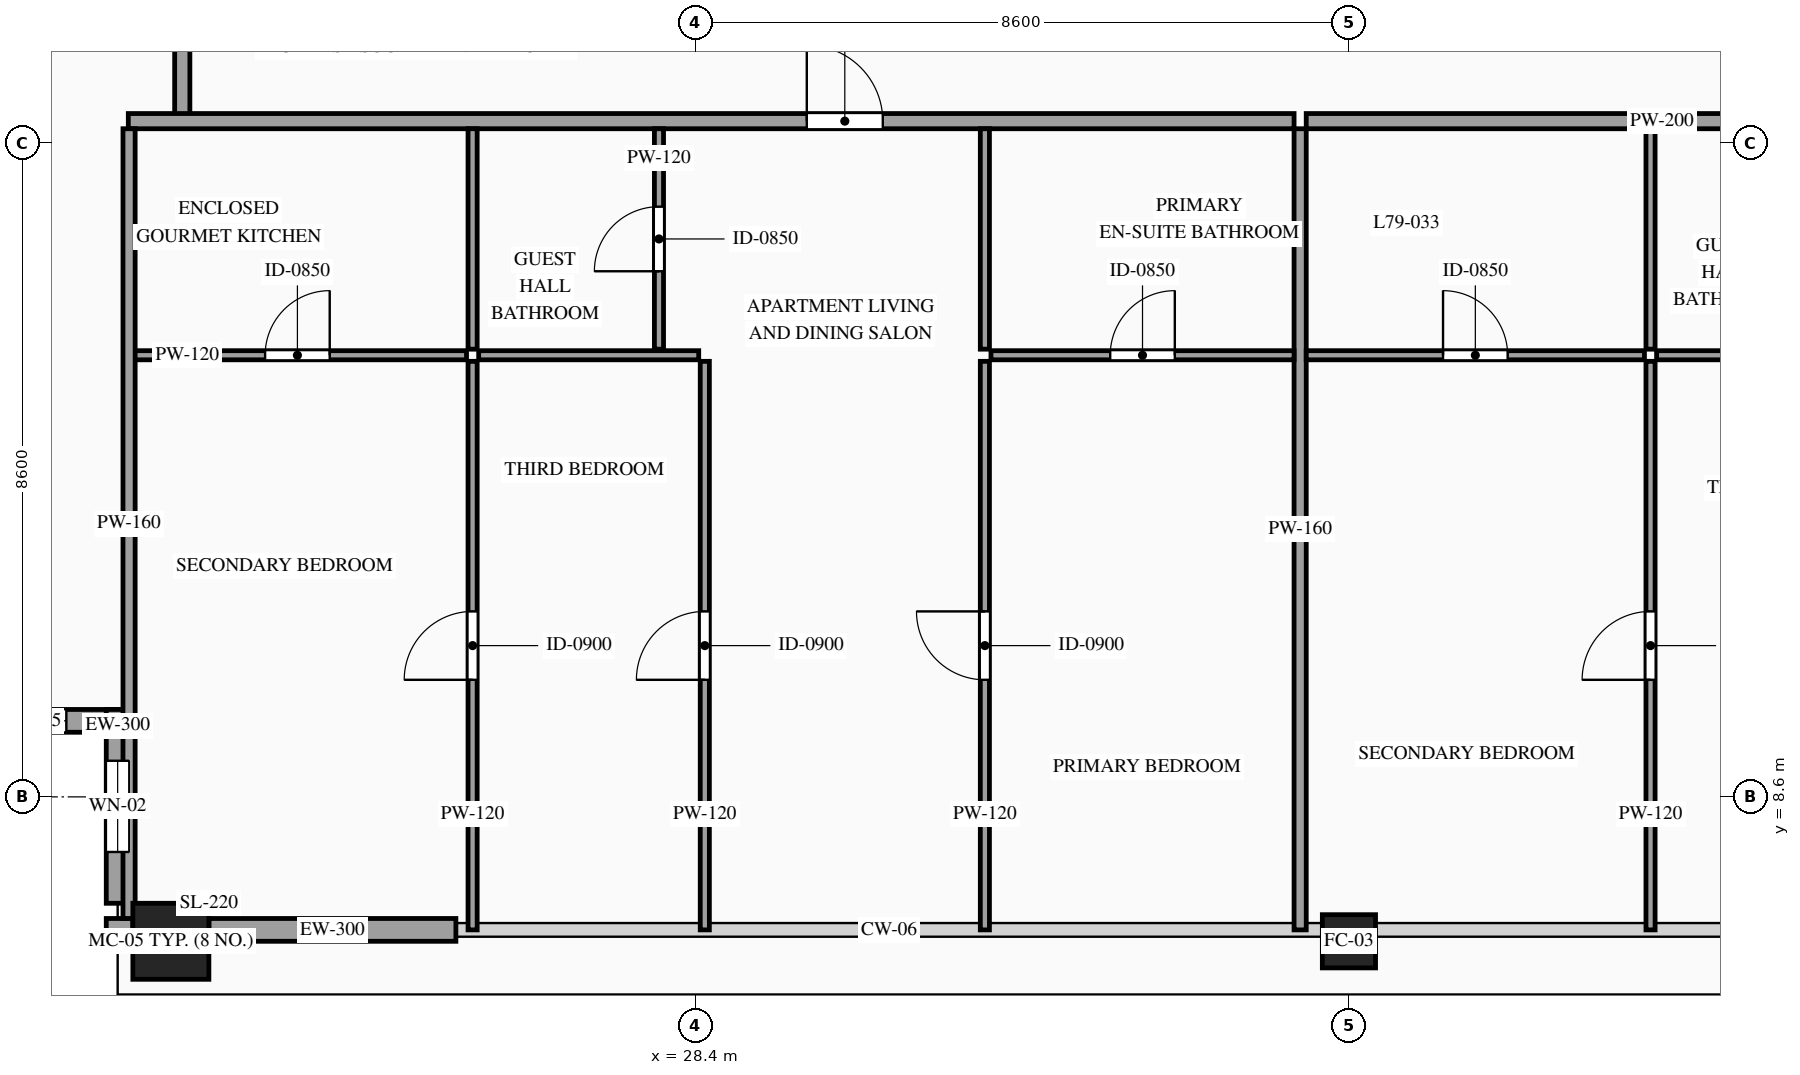
"""IFC4 building model, lengths in metres.
Left out: names, types, materials, properties, quantities, classifications, styles, units other than length and angle.
Written with IfcOpenShell. Run it as: python <this file> out.ifc"""

import sys

from ifc_helpers import new_model, si_unit, direction, frame, frame_2d, origin, origin_2d, place, context, subcontext, project, spatial, rectangle, hollow_rectangle, extrude, source, transform, mapped, element, fill, save


model = new_model("IFC4")
c1 = context("Model", 3, precision=1e-05, world=origin(), true_north=direction((0.0, 1.0)))
c2 = subcontext(c1, "Body", "Model", "MODEL_VIEW")
j1 = project(units=[si_unit("LENGTHUNIT", "METRE"), si_unit("PLANEANGLEUNIT", "RADIAN")], contexts=[c1])
p1 = place(None, origin())
s1 = spatial("IfcSite", under=j1, at=p1, CompositionType="ELEMENT")
p2 = place(p1, origin())
s2 = spatial("IfcBuilding", under=s1, at=p2, CompositionType="ELEMENT")
p3 = place(p2, frame((0.0, 0.0, 296.1)))
s3 = spatial("IfcBuildingStorey", under=s2, at=p3, CompositionType="ELEMENT", Elevation=296.1)
m1 = source(origin(), c2, "Body", "SweptSolid", [
    extrude(hollow_rectangle(XDim=1.0, YDim=1.0, WallThickness=0.048, at=origin_2d()), origin(), (0.0, 0.0, 1.0), 3.5),
])
p4 = place(p3, frame((21.5, 6.7, 0.0), z_axis=(0.0, 0.0, 1.0), x_axis=(1.0, 0.0, 0.0)))
e1 = element("IfcColumn", 1, at=p4, inside=s3, PredefinedType="COLUMN", context=c2, shape_type="MappedRepresentation", body=[
    mapped(m1, transform((0.0, 0.0, 0.0), scale=1.0)),
])
m2 = source(origin(), c2, "Body", "SweptSolid", [
    extrude(hollow_rectangle(XDim=0.7, YDim=0.7, WallThickness=0.032, at=origin_2d()), origin(), (0.0, 0.0, 1.0), 3.5),
])
p5 = place(p3, frame((37.0, 6.7, 0.0), z_axis=(0.0, 0.0, 1.0), x_axis=(1.0, 0.0, 0.0)))
e2 = element("IfcColumn", 2, at=p5, inside=s3, PredefinedType="COLUMN", context=c2, shape_type="MappedRepresentation", body=[
    mapped(m2, transform((0.0, 0.0, 0.0), scale=1.0)),
])
p6 = place(p3, frame((18.4, 9.6, 0.0), z_axis=(0.0, 0.0, 1.0), x_axis=(1.0, 0.0, 0.0)))
e3 = element("IfcWall", 3, at=p6, inside=s3, PredefinedType="SOLIDWALL", context=c2, shape_type="SweptSolid", body=[
    extrude(rectangle(XDim=2.55, YDim=0.3, at=frame_2d((1.275, 0.0))), origin(), (0.0, 0.0, 1.0), 3.28),
])
p7 = place(p6, frame((0.825, 0.0, 0.85)))
e4 = element("IfcOpeningElement", 4, at=p7, cuts=e3, PredefinedType="OPENING", context=c2, shape_type="SweptSolid", body=[
    extrude(rectangle(XDim=0.9, YDim=1.5, at=frame_2d((0.45, 0.75))), frame((0.0, 0.165, 0.0), z_axis=(0.0, -1.0, 0.0), x_axis=(1.0, 0.0, 0.0)), (0.0, 0.0, 1.0), 0.33),
])
p8 = place(p3, frame((20.8, 9.75, 0.0), z_axis=(0.0, 0.0, 1.0), x_axis=(0.0, -1.0, 0.0)))
e5 = element("IfcWall", 5, at=p8, inside=s3, PredefinedType="SOLIDWALL", context=c2, shape_type="SweptSolid", body=[
    extrude(rectangle(XDim=2.55, YDim=0.3, at=frame_2d((1.275, 0.0))), origin(), (0.0, 0.0, 1.0), 3.28),
])
p9 = place(p8, frame((0.675, 0.0, 0.85)))
e6 = element("IfcOpeningElement", 6, at=p9, cuts=e5, PredefinedType="OPENING", context=c2, shape_type="SweptSolid", body=[
    extrude(rectangle(XDim=1.2, YDim=2.1, at=frame_2d((0.6, 1.05))), frame((0.0, 0.165, 0.0), z_axis=(0.0, -1.0, 0.0), x_axis=(1.0, 0.0, 0.0)), (0.0, 0.0, 1.0), 0.33),
])
m3 = source(origin(), c2, "Body", "SweptSolid", [
    extrude(rectangle(XDim=0.35, YDim=0.3, at=frame_2d((0.175, 0.0))), origin(), (0.0, 0.0, 1.0), 3.28),
])
p10 = place(p3, frame((20.65, 6.85, 0.0), z_axis=(0.0, 0.0, 1.0), x_axis=(1.0, 0.0, 0.0)))
e7 = element("IfcWall", 7, at=p10, inside=s3, PredefinedType="SOLIDWALL", context=c2, shape_type="MappedRepresentation", body=[
    mapped(m3, transform((0.0, 0.0, 0.0), scale=1.0)),
])
m4 = source(origin(), c2, "Body", "SweptSolid", [
    extrude(rectangle(XDim=3.25, YDim=0.3, at=frame_2d((1.625, 0.0))), origin(), (0.0, 0.0, 1.0), 2.885),
])
p11 = place(p3, frame((22.0, 6.85, 0.0), z_axis=(0.0, 0.0, 1.0), x_axis=(1.0, 0.0, 0.0)))
e8 = element("IfcWall", 8, at=p11, inside=s3, PredefinedType="SOLIDWALL", context=c2, shape_type="MappedRepresentation", body=[
    mapped(m4, transform((0.0, 0.0, 0.0), scale=1.0)),
])
m5 = source(origin(), c2, "Body", "SweptSolid", [
    extrude(rectangle(XDim=1.7, YDim=0.2, at=frame_2d((0.85, 0.0))), origin(), (0.0, 0.0, 1.0), 3.28),
])
p12 = place(p3, frame((21.65, 17.55, 0.0), z_axis=(0.0, 0.0, 1.0), x_axis=(0.0, 1.0, 0.0)))
e9 = element("IfcWall", 9, at=p12, inside=s3, PredefinedType="PARTITIONING", context=c2, shape_type="MappedRepresentation", body=[
    mapped(m5, transform((0.0, 0.0, 0.0), scale=1.0)),
])
p13 = place(p3, frame((20.94, 17.49, 0.0), z_axis=(0.0, 0.0, 1.0), x_axis=(1.0, 0.0, 0.0)))
e10 = element("IfcWall", 10, at=p13, inside=s3, PredefinedType="PARTITIONING", context=c2, shape_type="SweptSolid", body=[
    extrude(rectangle(XDim=15.338, YDim=0.2, at=frame_2d((7.669, 0.0))), origin(), (0.0, 0.0, 1.0), 3.28),
])
p14 = place(p13, frame((8.927, 0.0, 0.0)))
e11 = element("IfcOpeningElement", 11, at=p14, cuts=e10, PredefinedType="OPENING", context=c2, shape_type="SweptSolid", body=[
    extrude(rectangle(XDim=1.0, YDim=2.2, at=frame_2d((0.5, 1.1))), frame((0.0, 0.115, 0.0), z_axis=(0.0, -1.0, 0.0), x_axis=(1.0, 0.0, 0.0)), (0.0, 0.0, 1.0), 0.23),
])
m6 = source(origin(), c2, "Body", "SweptSolid", [
    extrude(rectangle(XDim=10.54, YDim=0.16, at=frame_2d((5.27, 0.0))), origin(), (0.0, 0.0, 1.0), 3.28),
])
p15 = place(p3, frame((36.358, 6.85, 0.0), z_axis=(0.0, 0.0, 1.0), x_axis=(0.0, 1.0, 0.0)))
e12 = element("IfcWall", 12, at=p15, inside=s3, PredefinedType="PARTITIONING", context=c2, shape_type="MappedRepresentation", body=[
    mapped(m6, transform((0.0, 0.0, 0.0), scale=1.0)),
])
p16 = place(p3, frame((20.94, 14.41, 0.0), z_axis=(0.0, 0.0, 1.0), x_axis=(1.0, 0.0, 0.0)))
e13 = element("IfcWall", 13, at=p16, inside=s3, PredefinedType="PARTITIONING", context=c2, shape_type="SweptSolid", body=[
    extrude(rectangle(XDim=4.45, YDim=0.12, at=frame_2d((2.225, 0.0))), origin(), (0.0, 0.0, 1.0), 3.28),
])
p17 = place(p16, frame((1.8, 0.0, 0.0)))
e14 = element("IfcOpeningElement", 14, at=p17, cuts=e13, PredefinedType="OPENING", context=c2, shape_type="SweptSolid", body=[
    extrude(rectangle(XDim=0.85, YDim=2.1, at=frame_2d((0.425, 1.05))), frame((0.0, 0.075, 0.0), z_axis=(0.0, -1.0, 0.0), x_axis=(1.0, 0.0, 0.0)), (0.0, 0.0, 1.0), 0.15),
])
m7 = source(origin(), c2, "Body", "SweptSolid", [
    extrude(rectangle(XDim=2.9, YDim=0.12, at=frame_2d((1.45, 0.0))), origin(), (0.0, 0.0, 1.0), 3.28),
])
p18 = place(p3, frame((25.47, 14.49, 0.0), z_axis=(0.0, 0.0, 1.0), x_axis=(0.0, 1.0, 0.0)))
e15 = element("IfcWall", 15, at=p18, inside=s3, PredefinedType="PARTITIONING", context=c2, shape_type="MappedRepresentation", body=[
    mapped(m7, transform((0.0, 0.0, 0.0), scale=1.0)),
])
p19 = place(p3, frame((27.922, 14.49, 0.0), z_axis=(0.0, 0.0, 1.0), x_axis=(0.0, 1.0, 0.0)))
e16 = element("IfcWall", 16, at=p19, inside=s3, PredefinedType="PARTITIONING", context=c2, shape_type="SweptSolid", body=[
    extrude(rectangle(XDim=2.9, YDim=0.12, at=frame_2d((1.45, 0.0))), origin(), (0.0, 0.0, 1.0), 3.28),
])
p20 = place(p19, frame((1.025, 0.0, 0.0)))
e17 = element("IfcOpeningElement", 17, at=p20, cuts=e16, PredefinedType="OPENING", context=c2, shape_type="SweptSolid", body=[
    extrude(rectangle(XDim=0.85, YDim=2.1, at=frame_2d((0.425, 1.05))), frame((0.0, 0.075, 0.0), z_axis=(0.0, -1.0, 0.0), x_axis=(1.0, 0.0, 0.0)), (0.0, 0.0, 1.0), 0.15),
])
p21 = place(p3, frame((32.29, 14.41, 0.0), z_axis=(0.0, 0.0, 1.0), x_axis=(1.0, 0.0, 0.0)))
e18 = element("IfcWall", 18, at=p21, inside=s3, PredefinedType="PARTITIONING", context=c2, shape_type="SweptSolid", body=[
    extrude(rectangle(XDim=3.988, YDim=0.12, at=frame_2d((1.994, 0.0))), origin(), (0.0, 0.0, 1.0), 3.28),
])
p22 = place(p21, frame((1.569, 0.0, 0.0)))
e19 = element("IfcOpeningElement", 19, at=p22, cuts=e18, PredefinedType="OPENING", context=c2, shape_type="SweptSolid", body=[
    extrude(rectangle(XDim=0.85, YDim=2.1, at=frame_2d((0.425, 1.05))), frame((0.0, 0.075, 0.0), z_axis=(0.0, -1.0, 0.0), x_axis=(1.0, 0.0, 0.0)), (0.0, 0.0, 1.0), 0.15),
])
p23 = place(p3, frame((32.21, 14.49, 0.0), z_axis=(0.0, 0.0, 1.0), x_axis=(0.0, 1.0, 0.0)))
e20 = element("IfcWall", 20, at=p23, inside=s3, PredefinedType="PARTITIONING", context=c2, shape_type="MappedRepresentation", body=[
    mapped(m7, transform((0.0, 0.0, 0.0), scale=1.0)),
])
p24 = place(p3, frame((25.47, 6.85, 0.0), z_axis=(0.0, 0.0, 1.0), x_axis=(0.0, 1.0, 0.0)))
e21 = element("IfcWall", 21, at=p24, inside=s3, PredefinedType="PARTITIONING", context=c2, shape_type="SweptSolid", body=[
    extrude(rectangle(XDim=7.48, YDim=0.12, at=frame_2d((3.74, 0.0))), origin(), (0.0, 0.0, 1.0), 3.28),
])
p25 = place(p24, frame((3.29, 0.0, 0.0)))
e22 = element("IfcOpeningElement", 22, at=p25, cuts=e21, PredefinedType="OPENING", context=c2, shape_type="SweptSolid", body=[
    extrude(rectangle(XDim=0.9, YDim=2.15, at=frame_2d((0.45, 1.075))), frame((0.0, 0.075, 0.0), z_axis=(0.0, -1.0, 0.0), x_axis=(1.0, 0.0, 0.0)), (0.0, 0.0, 1.0), 0.15),
])
p26 = place(p3, frame((32.21, 6.85, 0.0), z_axis=(0.0, 0.0, 1.0), x_axis=(0.0, 1.0, 0.0)))
e23 = element("IfcWall", 23, at=p26, inside=s3, PredefinedType="PARTITIONING", context=c2, shape_type="SweptSolid", body=[
    extrude(rectangle(XDim=7.48, YDim=0.12, at=frame_2d((3.74, 0.0))), origin(), (0.0, 0.0, 1.0), 3.28),
])
p27 = place(p26, frame((3.29, 0.0, 0.0)))
e24 = element("IfcOpeningElement", 24, at=p27, cuts=e23, PredefinedType="OPENING", context=c2, shape_type="SweptSolid", body=[
    extrude(rectangle(XDim=0.9, YDim=2.15, at=frame_2d((0.45, 1.075))), frame((0.0, 0.075, 0.0), z_axis=(0.0, -1.0, 0.0), x_axis=(1.0, 0.0, 0.0)), (0.0, 0.0, 1.0), 0.15),
])
m8 = source(origin(), c2, "Body", "SweptSolid", [
    extrude(rectangle(XDim=2.895, YDim=0.12, at=frame_2d((1.448, 0.0))), origin(), (0.0, 0.0, 1.0), 3.28),
])
p28 = place(p3, frame((25.55, 14.41, 0.0), z_axis=(0.0, 0.0, 1.0), x_axis=(1.0, 0.0, 0.0)))
e25 = element("IfcWall", 25, at=p28, inside=s3, PredefinedType="PARTITIONING", context=c2, shape_type="MappedRepresentation", body=[
    mapped(m8, transform((0.0, 0.0, 0.0), scale=1.0)),
])
p29 = place(p3, frame((28.525, 6.85, 0.0), z_axis=(0.0, 0.0, 1.0), x_axis=(0.0, 1.0, 0.0)))
e26 = element("IfcWall", 26, at=p29, inside=s3, PredefinedType="PARTITIONING", context=c2, shape_type="SweptSolid", body=[
    extrude(rectangle(XDim=7.48, YDim=0.12, at=frame_2d((3.74, 0.0))), origin(), (0.0, 0.0, 1.0), 3.28),
])
p30 = place(p29, frame((3.29, 0.0, 0.0)))
e27 = element("IfcOpeningElement", 27, at=p30, cuts=e26, PredefinedType="OPENING", context=c2, shape_type="SweptSolid", body=[
    extrude(rectangle(XDim=0.9, YDim=2.15, at=frame_2d((0.45, 1.075))), frame((0.0, 0.075, 0.0), z_axis=(0.0, -1.0, 0.0), x_axis=(1.0, 0.0, 0.0)), (0.0, 0.0, 1.0), 0.15),
])
p31 = place(p3, frame((36.438, 17.49, 0.0), z_axis=(0.0, 0.0, 1.0), x_axis=(1.0, 0.0, 0.0)))
e28 = element("IfcWall", 28, at=p31, inside=s3, PredefinedType="PARTITIONING", context=c2, shape_type="SweptSolid", body=[
    extrude(rectangle(XDim=16.622, YDim=0.2, at=frame_2d((8.311, 0.0))), origin(), (0.0, 0.0, 1.0), 3.28),
])
p32 = place(p31, frame((9.611, 0.0, 0.0)))
e29 = element("IfcOpeningElement", 29, at=p32, cuts=e28, PredefinedType="OPENING", context=c2, shape_type="SweptSolid", body=[
    extrude(rectangle(XDim=1.0, YDim=2.2, at=frame_2d((0.5, 1.1))), frame((0.0, 0.115, 0.0), z_axis=(0.0, -1.0, 0.0), x_axis=(1.0, 0.0, 0.0)), (0.0, 0.0, 1.0), 0.23),
])
m9 = source(origin(), c2, "Body", "SweptSolid", [
    extrude(rectangle(XDim=10.39, YDim=0.16, at=frame_2d((5.195, 0.0))), origin(), (0.0, 0.0, 1.0), 3.28),
])
p33 = place(p3, frame((20.95, 7.0, 0.0), z_axis=(0.0, 0.0, 1.0), x_axis=(0.0, 1.0, 0.0)))
e30 = element("IfcWall", 30, at=p33, inside=s3, PredefinedType="PARTITIONING", context=c2, shape_type="MappedRepresentation", body=[
    mapped(m9, transform((0.0, 0.0, 0.0), scale=1.0)),
])
p34 = place(p3, frame((36.438, 14.41, 0.0), z_axis=(0.0, 0.0, 1.0), x_axis=(1.0, 0.0, 0.0)))
e31 = element("IfcWall", 31, at=p34, inside=s3, PredefinedType="PARTITIONING", context=c2, shape_type="SweptSolid", body=[
    extrude(rectangle(XDim=4.45, YDim=0.12, at=frame_2d((2.225, 0.0))), origin(), (0.0, 0.0, 1.0), 3.28),
])
p35 = place(p34, frame((1.8, 0.0, 0.0)))
e32 = element("IfcOpeningElement", 32, at=p35, cuts=e31, PredefinedType="OPENING", context=c2, shape_type="SweptSolid", body=[
    extrude(rectangle(XDim=0.85, YDim=2.1, at=frame_2d((0.425, 1.05))), frame((0.0, 0.075, 0.0), z_axis=(0.0, -1.0, 0.0), x_axis=(1.0, 0.0, 0.0)), (0.0, 0.0, 1.0), 0.15),
])
p36 = place(p3, frame((40.968, 14.49, 0.0), z_axis=(0.0, 0.0, 1.0), x_axis=(0.0, 1.0, 0.0)))
e33 = element("IfcWall", 33, at=p36, inside=s3, PredefinedType="PARTITIONING", context=c2, shape_type="MappedRepresentation", body=[
    mapped(m7, transform((0.0, 0.0, 0.0), scale=1.0)),
])
p37 = place(p3, frame((40.968, 6.85, 0.0), z_axis=(0.0, 0.0, 1.0), x_axis=(0.0, 1.0, 0.0)))
e34 = element("IfcWall", 34, at=p37, inside=s3, PredefinedType="PARTITIONING", context=c2, shape_type="SweptSolid", body=[
    extrude(rectangle(XDim=7.48, YDim=0.12, at=frame_2d((3.74, 0.0))), origin(), (0.0, 0.0, 1.0), 3.28),
])
p38 = place(p37, frame((3.29, 0.0, 0.0)))
e35 = element("IfcOpeningElement", 35, at=p38, cuts=e34, PredefinedType="OPENING", context=c2, shape_type="SweptSolid", body=[
    extrude(rectangle(XDim=0.9, YDim=2.15, at=frame_2d((0.45, 1.075))), frame((0.0, 0.075, 0.0), z_axis=(0.0, -1.0, 0.0), x_axis=(1.0, 0.0, 0.0)), (0.0, 0.0, 1.0), 0.15),
])
m10 = source(origin(), c2, "Body", "SweptSolid", [
    extrude(rectangle(XDim=3.313, YDim=0.12, at=frame_2d((1.656, 0.0))), origin(), (0.0, 0.0, 1.0), 3.28),
])
p39 = place(p3, frame((41.048, 14.41, 0.0), z_axis=(0.0, 0.0, 1.0), x_axis=(1.0, 0.0, 0.0)))
e36 = element("IfcWall", 36, at=p39, inside=s3, PredefinedType="PARTITIONING", context=c2, shape_type="MappedRepresentation", body=[
    mapped(m10, transform((0.0, 0.0, 0.0), scale=1.0)),
])
m11 = source(origin(), c2, "Body", "SweptSolid", [
    extrude(rectangle(XDim=0.9, YDim=1.5, at=frame_2d((0.45, 0.75))), frame((0.0, 0.03, 0.0), z_axis=(0.0, -1.0, 0.0), x_axis=(1.0, 0.0, 0.0)), (0.0, 0.0, 1.0), 0.06),
])
p40 = place(p7, origin())
e37 = element("IfcWindow", 37, at=p40, inside=s3, PartitioningType="SINGLE_PANEL", PredefinedType="WINDOW", context=c2, shape_type="MappedRepresentation", body=[
    mapped(m11, transform((0.0, 0.0, 0.0), scale=1.0)),
])
fill(e4, e37)
m12 = source(origin(), c2, "Body", "SweptSolid", [
    extrude(rectangle(XDim=1.2, YDim=2.1, at=frame_2d((0.6, 1.05))), frame((0.0, 0.03, 0.0), z_axis=(0.0, -1.0, 0.0), x_axis=(1.0, 0.0, 0.0)), (0.0, 0.0, 1.0), 0.06),
])
p41 = place(p9, origin())
e38 = element("IfcWindow", 38, at=p41, inside=s3, PartitioningType="SINGLE_PANEL", PredefinedType="WINDOW", context=c2, shape_type="MappedRepresentation", body=[
    mapped(m12, transform((0.0, 0.0, 0.0), scale=1.0)),
])
fill(e6, e38)
m13 = source(origin(), c2, "Body", "SweptSolid", [
    extrude(rectangle(XDim=1.0, YDim=2.2, at=frame_2d((0.5, 1.1))), frame((0.0, 0.025, 0.0), z_axis=(0.0, -1.0, 0.0), x_axis=(1.0, 0.0, 0.0)), (0.0, 0.0, 1.0), 0.05),
])
p42 = place(p14, origin())
e39 = element("IfcDoor", 39, at=p42, inside=s3, OperationType="SINGLE_SWING_LEFT", PredefinedType="DOOR", context=c2, shape_type="MappedRepresentation", body=[
    mapped(m13, transform((0.0, 0.0, 0.0), scale=1.0)),
])
fill(e11, e39)
m14 = source(origin(), c2, "Body", "SweptSolid", [
    extrude(rectangle(XDim=0.85, YDim=2.1, at=frame_2d((0.425, 1.05))), frame((0.0, 0.025, 0.0), z_axis=(0.0, -1.0, 0.0), x_axis=(1.0, 0.0, 0.0)), (0.0, 0.0, 1.0), 0.05),
])
p43 = place(p17, origin())
e40 = element("IfcDoor", 40, at=p43, inside=s3, OperationType="SINGLE_SWING_RIGHT", PredefinedType="DOOR", context=c2, shape_type="MappedRepresentation", body=[
    mapped(m14, transform((0.0, 0.0, 0.0), scale=1.0)),
])
fill(e14, e40)
p44 = place(p20, origin())
e41 = element("IfcDoor", 41, at=p44, inside=s3, OperationType="SINGLE_SWING_LEFT", PredefinedType="DOOR", context=c2, shape_type="MappedRepresentation", body=[
    mapped(m14, transform((0.0, 0.0, 0.0), scale=1.0)),
])
fill(e17, e41)
p45 = place(p22, origin())
e42 = element("IfcDoor", 42, at=p45, inside=s3, OperationType="SINGLE_SWING_RIGHT", PredefinedType="DOOR", context=c2, shape_type="MappedRepresentation", body=[
    mapped(m14, transform((0.0, 0.0, 0.0), scale=1.0)),
])
fill(e19, e42)
m15 = source(origin(), c2, "Body", "SweptSolid", [
    extrude(rectangle(XDim=0.9, YDim=2.15, at=frame_2d((0.45, 1.075))), frame((0.0, 0.025, 0.0), z_axis=(0.0, -1.0, 0.0), x_axis=(1.0, 0.0, 0.0)), (0.0, 0.0, 1.0), 0.05),
])
p46 = place(p25, origin())
e43 = element("IfcDoor", 43, at=p46, inside=s3, OperationType="SINGLE_SWING_LEFT", PredefinedType="DOOR", context=c2, shape_type="MappedRepresentation", body=[
    mapped(m15, transform((0.0, 0.0, 0.0), scale=1.0)),
])
fill(e22, e43)
p47 = place(p27, origin())
e44 = element("IfcDoor", 44, at=p47, inside=s3, OperationType="SINGLE_SWING_RIGHT", PredefinedType="DOOR", context=c2, shape_type="MappedRepresentation", body=[
    mapped(m15, transform((0.0, 0.0, 0.0), scale=1.0)),
])
fill(e24, e44)
p48 = place(p30, origin())
e45 = element("IfcDoor", 45, at=p48, inside=s3, OperationType="SINGLE_SWING_LEFT", PredefinedType="DOOR", context=c2, shape_type="MappedRepresentation", body=[
    mapped(m15, transform((0.0, 0.0, 0.0), scale=1.0)),
])
fill(e27, e45)
p49 = place(p35, origin())
e46 = element("IfcDoor", 46, at=p49, inside=s3, OperationType="SINGLE_SWING_LEFT", PredefinedType="DOOR", context=c2, shape_type="MappedRepresentation", body=[
    mapped(m14, transform((0.0, 0.0, 0.0), scale=1.0)),
])
fill(e32, e46)
p50 = place(p38, origin())
e47 = element("IfcDoor", 47, at=p50, inside=s3, OperationType="SINGLE_SWING_LEFT", PredefinedType="DOOR", context=c2, shape_type="MappedRepresentation", body=[
    mapped(m15, transform((0.0, 0.0, 0.0), scale=1.0)),
])
fill(e35, e47)
save(model, sys.argv[1])
